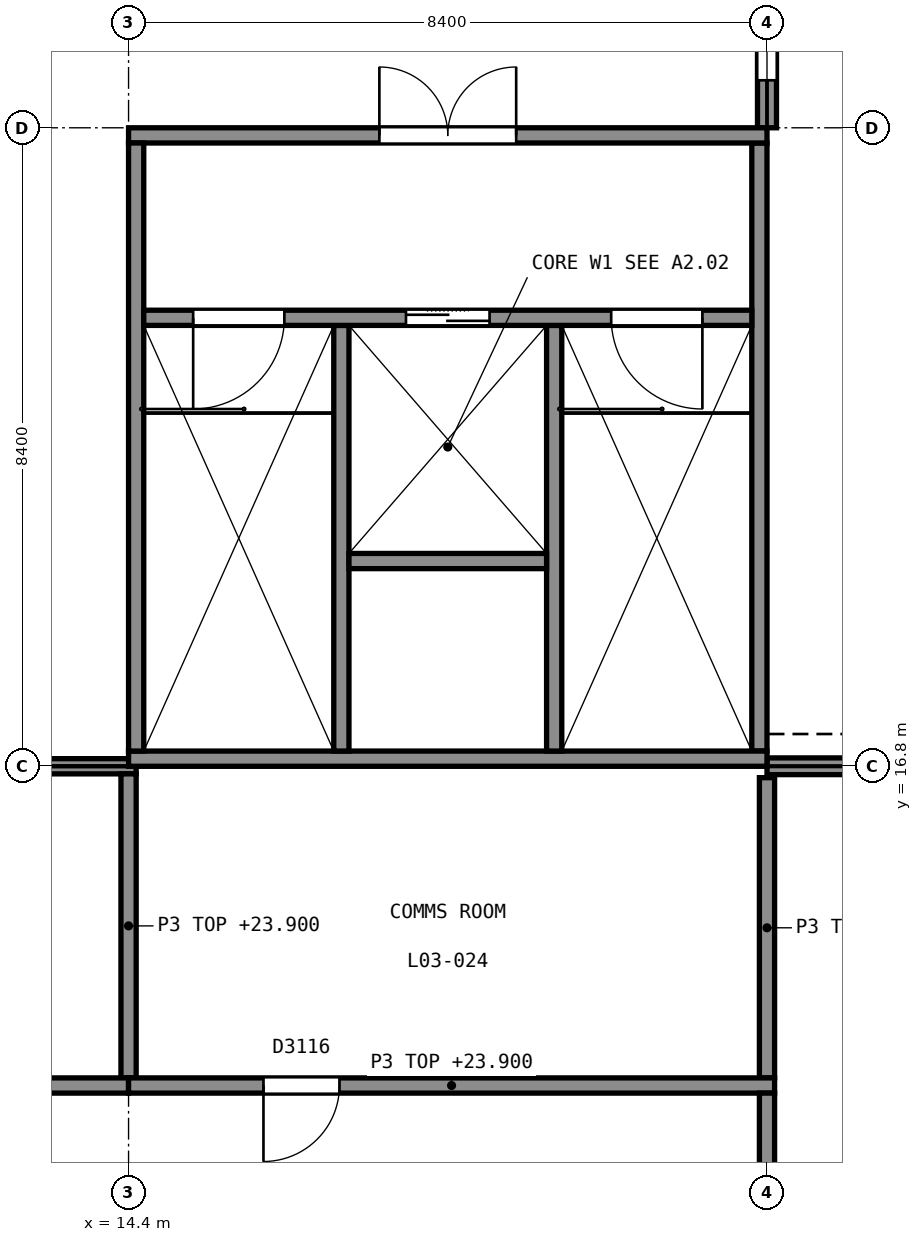
"""IFC4 building model, lengths in metres.
Left out: names, types, materials, properties, quantities, classifications, styles, units other than length and angle.
Written with IfcOpenShell. Run it as: python <this file> out.ifc"""

import sys

from ifc_helpers import new_model, si_unit, direction, frame, frame_2d, origin, place, context, subcontext, project, spatial, polyline, rectangle, outline, extrude, element, fill, save


model = new_model("IFC4")
c1 = context("Model", 3, precision=1e-05, world=origin(), true_north=direction((0.0, 1.0)))
c2 = subcontext(c1, "Body", "Model", "MODEL_VIEW")
j1 = project(units=[si_unit("LENGTHUNIT", "METRE"), si_unit("PLANEANGLEUNIT", "RADIAN")], contexts=[c1])
p1 = place(None, origin())
s1 = spatial("IfcSite", under=j1, at=p1, CompositionType="ELEMENT")
p2 = place(p1, origin())
s2 = spatial("IfcBuilding", under=s1, at=p2, CompositionType="ELEMENT")
p3 = place(p2, frame((0.0, 0.0, 20.0)))
s3 = spatial("IfcBuildingStorey", under=s2, at=p3, CompositionType="ELEMENT", Elevation=20.0)
p4 = place(p3, frame((14.4, 16.9, 0.0), z_axis=(0.0, 0.0, 1.0), x_axis=(1.0, 0.0, 0.0)))
e1 = element("IfcWall", 1, at=p4, inside=s3, PredefinedType="SHEAR", context=c2, shape_type="SweptSolid", body=[
    extrude(rectangle(XDim=8.4, YDim=0.2, at=frame_2d((4.2, 0.0))), origin(), (0.0, 0.0, 1.0), 8.8),
])
p5 = place(p3, frame((14.4, 25.1, 0.0), z_axis=(0.0, 0.0, 1.0), x_axis=(1.0, 0.0, 0.0)))
e2 = element("IfcWall", 2, at=p5, inside=s3, PredefinedType="SHEAR", context=c2, shape_type="SweptSolid", body=[
    extrude(outline(polyline([(0.0, 0.0), (8.4, 0.0), (8.4, 8.8), (7.531, 8.572), (7.241, 8.497), (5.503, 8.041), (5.214, 7.966), (3.186, 7.434), (2.896, 7.359), (1.159, 6.903), (0.869, 6.828), (0.0, 6.6), (0.0, 0.0)])), frame((0.0, 0.1, 0.0), z_axis=(0.0, -1.0, 0.0), x_axis=(1.0, 0.0, 0.0)), (0.0, 0.0, 1.0), 0.2),
])
p6 = place(p5, frame((3.3, 0.0, 0.0)))
e3 = element("IfcOpeningElement", 3, at=p6, cuts=e2, PredefinedType="OPENING", context=c2, shape_type="SweptSolid", body=[
    extrude(rectangle(XDim=1.8, YDim=2.1, at=frame_2d((0.9, 1.05))), frame((0.0, 0.11, 0.0), z_axis=(0.0, -1.0, 0.0), x_axis=(1.0, 0.0, 0.0)), (0.0, 0.0, 1.0), 0.22),
])
p7 = place(p3, frame((14.5, 17.0, 0.0), z_axis=(0.0, 0.0, 1.0), x_axis=(0.0, 1.0, 0.0)))
e4 = element("IfcWall", 4, at=p7, inside=s3, PredefinedType="SHEAR", context=c2, shape_type="SweptSolid", body=[
    extrude(rectangle(XDim=8.0, YDim=0.2, at=frame_2d((4.0, 0.0))), origin(), (0.0, 0.0, 1.0), 6.625),
])
p8 = place(p3, frame((22.7, 17.0, 0.0), z_axis=(0.0, 0.0, 1.0), x_axis=(0.0, 1.0, 0.0)))
e5 = element("IfcWall", 5, at=p8, inside=s3, PredefinedType="SHEAR", context=c2, shape_type="SweptSolid", body=[
    extrude(rectangle(XDim=8.0, YDim=0.2, at=frame_2d((4.0, 0.0))), origin(), (0.0, 0.0, 1.0), 8.775),
])
p9 = place(p3, frame((14.6, 22.7, 0.0), z_axis=(0.0, 0.0, 1.0), x_axis=(1.0, 0.0, 0.0)))
e6 = element("IfcWall", 6, at=p9, inside=s3, PredefinedType="SHEAR", context=c2, shape_type="SweptSolid", body=[
    extrude(outline(polyline([(0.0, 0.0), (8.0, 0.0), (8.0, 8.748), (7.407, 8.592), (7.111, 8.515), (6.815, 8.437), (6.519, 8.36), (5.926, 8.204), (5.63, 8.127), (5.333, 8.049), (5.037, 7.972), (4.444, 7.816), (4.148, 7.739), (3.852, 7.661), (3.556, 7.584), (2.963, 7.428), (2.667, 7.351), (2.37, 7.273), (2.074, 7.196), (1.481, 7.04), (1.185, 6.963), (0.889, 6.885), (0.593, 6.808), (0.0, 6.652), (0.0, 0.0)])), frame((0.0, 0.1, 0.0), z_axis=(0.0, -1.0, 0.0), x_axis=(1.0, 0.0, 0.0)), (0.0, 0.0, 1.0), 0.2),
])
p10 = place(p9, frame((0.65, 0.0, 0.0)))
e7 = element("IfcOpeningElement", 7, at=p10, cuts=e6, PredefinedType="OPENING", context=c2, shape_type="SweptSolid", body=[
    extrude(rectangle(XDim=1.2, YDim=2.1, at=frame_2d((0.6, 1.05))), frame((0.0, 0.11, 0.0), z_axis=(0.0, -1.0, 0.0), x_axis=(1.0, 0.0, 0.0)), (0.0, 0.0, 1.0), 0.22),
])
p11 = place(p9, frame((6.15, 0.0, 0.0)))
e8 = element("IfcOpeningElement", 8, at=p11, cuts=e6, PredefinedType="OPENING", context=c2, shape_type="SweptSolid", body=[
    extrude(rectangle(XDim=1.2, YDim=2.1, at=frame_2d((0.6, 1.05))), frame((0.0, 0.11, 0.0), z_axis=(0.0, -1.0, 0.0), x_axis=(1.0, 0.0, 0.0)), (0.0, 0.0, 1.0), 0.22),
])
p12 = place(p9, frame((3.45, 0.0, 0.0)))
e9 = element("IfcOpeningElement", 9, at=p12, cuts=e6, PredefinedType="OPENING", context=c2, shape_type="SweptSolid", body=[
    extrude(rectangle(XDim=1.1, YDim=2.1, at=frame_2d((0.55, 1.05))), frame((0.0, 0.11, 0.0), z_axis=(0.0, -1.0, 0.0), x_axis=(1.0, 0.0, 0.0)), (0.0, 0.0, 1.0), 0.22),
])
p13 = place(p3, frame((17.2, 17.0, 0.0), z_axis=(0.0, 0.0, 1.0), x_axis=(0.0, 1.0, 0.0)))
e10 = element("IfcWall", 10, at=p13, inside=s3, PredefinedType="SHEAR", context=c2, shape_type="SweptSolid", body=[
    extrude(rectangle(XDim=5.6, YDim=0.2, at=frame_2d((2.8, 0.0))), origin(), (0.0, 0.0, 1.0), 7.333),
])
p14 = place(p3, frame((20.0, 17.0, 0.0), z_axis=(0.0, 0.0, 1.0), x_axis=(0.0, 1.0, 0.0)))
e11 = element("IfcWall", 11, at=p14, inside=s3, PredefinedType="SHEAR", context=c2, shape_type="SweptSolid", body=[
    extrude(rectangle(XDim=5.6, YDim=0.2, at=frame_2d((2.8, 0.0))), origin(), (0.0, 0.0, 1.0), 8.067),
])
p15 = place(p3, frame((17.3, 19.5, 0.0), z_axis=(0.0, 0.0, 1.0), x_axis=(1.0, 0.0, 0.0)))
e12 = element("IfcWall", 12, at=p15, inside=s3, PredefinedType="SHEAR", context=c2, shape_type="SweptSolid", body=[
    extrude(outline(polyline([(0.0, 0.0), (2.6, 0.0), (2.6, 8.04), (2.311, 7.965), (1.733, 7.813), (1.444, 7.738), (1.156, 7.662), (0.867, 7.587), (0.289, 7.435), (0.0, 7.36), (0.0, 0.0)])), frame((0.0, 0.1, 0.0), z_axis=(0.0, -1.0, 0.0), x_axis=(1.0, 0.0, 0.0)), (0.0, 0.0, 1.0), 0.2),
])
p16 = place(p3, frame((22.8, 16.8, 0.0), z_axis=(0.0, 0.0, 1.0), x_axis=(1.0, 0.0, 0.0)))
e13 = element("IfcWall", 13, at=p16, inside=s3, PredefinedType="SOLIDWALL", context=c2, shape_type="SweptSolid", body=[
    extrude(rectangle(XDim=8.05, YDim=0.22, at=frame_2d((4.025, 0.0))), origin(), (0.0, 0.0, 1.0), 3.94),
])
p17 = place(p16, frame((2.225, 0.0, 0.9)))
e14 = element("IfcOpeningElement", 14, at=p17, cuts=e13, PredefinedType="OPENING", context=c2, shape_type="SweptSolid", body=[
    extrude(rectangle(XDim=3.6, YDim=1.5, at=frame_2d((1.8, 0.75))), frame((0.0, 0.12, 0.0), z_axis=(0.0, -1.0, 0.0), x_axis=(1.0, 0.0, 0.0)), (0.0, 0.0, 1.0), 0.24),
])
p18 = place(p3, frame((22.8, 25.2, 0.0), z_axis=(0.0, 0.0, 1.0), x_axis=(0.0, 1.0, 0.0)))
e15 = element("IfcWall", 15, at=p18, inside=s3, PredefinedType="SOLIDWALL", context=c2, shape_type="SweptSolid", body=[
    extrude(rectangle(XDim=8.05, YDim=0.25, at=frame_2d((4.025, 0.0))), origin(), (0.0, 0.0, 1.0), 8.746),
])
p19 = place(p18, frame((0.625, 0.0, 0.9)))
e16 = element("IfcOpeningElement", 16, at=p19, cuts=e15, PredefinedType="OPENING", context=c2, shape_type="SweptSolid", body=[
    extrude(rectangle(XDim=1.2, YDim=2.1, at=frame_2d((0.6, 1.05))), frame((0.0, 0.135, 0.0), z_axis=(0.0, -1.0, 0.0), x_axis=(1.0, 0.0, 0.0)), (0.0, 0.0, 1.0), 0.27),
])
p20 = place(p18, frame((2.85, 0.0, 0.9)))
e17 = element("IfcOpeningElement", 17, at=p20, cuts=e15, PredefinedType="OPENING", context=c2, shape_type="SweptSolid", body=[
    extrude(rectangle(XDim=1.2, YDim=2.1, at=frame_2d((0.6, 1.05))), frame((0.0, 0.135, 0.0), z_axis=(0.0, -1.0, 0.0), x_axis=(1.0, 0.0, 0.0)), (0.0, 0.0, 1.0), 0.27),
])
p21 = place(p18, frame((6.225, 0.0, 0.9)))
e18 = element("IfcOpeningElement", 18, at=p21, cuts=e15, PredefinedType="OPENING", context=c2, shape_type="SweptSolid", body=[
    extrude(rectangle(XDim=1.2, YDim=2.1, at=frame_2d((0.6, 1.05))), frame((0.0, 0.135, 0.0), z_axis=(0.0, -1.0, 0.0), x_axis=(1.0, 0.0, 0.0)), (0.0, 0.0, 1.0), 0.27),
])
p22 = place(p3, frame((6.35, 16.8, 0.0), z_axis=(0.0, 0.0, 1.0), x_axis=(1.0, 0.0, 0.0)))
e19 = element("IfcWall", 19, at=p22, inside=s3, PredefinedType="PARTITIONING", context=c2, shape_type="SweptSolid", body=[
    extrude(rectangle(XDim=8.15, YDim=0.2, at=frame_2d((4.075, 0.0))), origin(), (0.0, 0.0, 1.0), 3.562),
])
p23 = place(p22, frame((5.438, 0.0, 0.0)))
e20 = element("IfcOpeningElement", 20, at=p23, cuts=e19, PredefinedType="OPENING", context=c2, shape_type="SweptSolid", body=[
    extrude(rectangle(XDim=1.0, YDim=2.1, at=frame_2d((0.5, 1.05))), frame((0.0, 0.11, 0.0), z_axis=(0.0, -1.0, 0.0), x_axis=(1.0, 0.0, 0.0)), (0.0, 0.0, 1.0), 0.22),
])
p24 = place(p3, frame((14.4, 12.7, 0.0), z_axis=(0.0, 0.0, 1.0), x_axis=(0.0, 1.0, 0.0)))
e21 = element("IfcWall", 21, at=p24, inside=s3, PredefinedType="PARTITIONING", context=c2, shape_type="SweptSolid", body=[
    extrude(rectangle(XDim=4.0, YDim=0.2, at=frame_2d((2.0, 0.0))), origin(), (0.0, 0.0, 1.0), 3.9),
])
p25 = place(p3, frame((22.8, 12.7, 0.0), z_axis=(0.0, 0.0, 1.0), x_axis=(0.0, 1.0, 0.0)))
e22 = element("IfcWall", 22, at=p25, inside=s3, PredefinedType="PARTITIONING", context=c2, shape_type="SweptSolid", body=[
    extrude(rectangle(XDim=3.95, YDim=0.2, at=frame_2d((1.975, 0.0))), origin(), (0.0, 0.0, 1.0), 3.9),
])
p26 = place(p3, frame((6.15, 12.6, 0.0), z_axis=(0.0, 0.0, 1.0), x_axis=(1.0, 0.0, 0.0)))
e23 = element("IfcWall", 23, at=p26, inside=s3, PredefinedType="PARTITIONING", context=c2, shape_type="SweptSolid", body=[
    extrude(rectangle(XDim=8.25, YDim=0.2, at=frame_2d((4.125, 0.0))), origin(), (0.0, 0.0, 1.0), 3.9),
])
p27 = place(p3, frame((14.4, 12.6, 0.0), z_axis=(0.0, 0.0, 1.0), x_axis=(1.0, 0.0, 0.0)))
e24 = element("IfcWall", 24, at=p27, inside=s3, PredefinedType="PARTITIONING", context=c2, shape_type="SweptSolid", body=[
    extrude(rectangle(XDim=8.5, YDim=0.2, at=frame_2d((4.25, 0.0))), origin(), (0.0, 0.0, 1.0), 3.9),
])
p28 = place(p27, frame((1.775, 0.0, 0.0)))
e25 = element("IfcOpeningElement", 25, at=p28, cuts=e24, PredefinedType="OPENING", context=c2, shape_type="SweptSolid", body=[
    extrude(rectangle(XDim=1.0, YDim=2.1, at=frame_2d((0.5, 1.05))), frame((0.0, 0.11, 0.0), z_axis=(0.0, -1.0, 0.0), x_axis=(1.0, 0.0, 0.0)), (0.0, 0.0, 1.0), 0.22),
])
p29 = place(p3, frame((22.8, 8.75, 0.0), z_axis=(0.0, 0.0, 1.0), x_axis=(0.0, 1.0, 0.0)))
e26 = element("IfcWall", 26, at=p29, inside=s3, PredefinedType="PARTITIONING", context=c2, shape_type="SweptSolid", body=[
    extrude(rectangle(XDim=3.75, YDim=0.2, at=frame_2d((1.875, 0.0))), origin(), (0.0, 0.0, 1.0), 3.9),
])
p30 = place(p19, origin())
e27 = element("IfcWindow", 27, at=p30, inside=s3, PartitioningType="SINGLE_PANEL", PredefinedType="WINDOW", context=c2, shape_type="SweptSolid", body=[
    extrude(rectangle(XDim=1.2, YDim=2.1, at=frame_2d((0.6, 1.05))), frame((0.0, 0.105, 0.0), z_axis=(0.0, -1.0, 0.0), x_axis=(1.0, 0.0, 0.0)), (0.0, 0.0, 1.0), 0.06),
])
fill(e16, e27)
p31 = place(p28, origin())
e28 = element("IfcDoor", 28, at=p31, inside=s3, OperationType="SINGLE_SWING_LEFT", PredefinedType="DOOR", context=c2, shape_type="SweptSolid", body=[
    extrude(rectangle(XDim=1.0, YDim=2.1, at=frame_2d((0.5, 1.05))), frame((0.0, 0.025, 0.0), z_axis=(0.0, -1.0, 0.0), x_axis=(1.0, 0.0, 0.0)), (0.0, 0.0, 1.0), 0.05),
])
fill(e25, e28)
p32 = place(p6, origin())
e29 = element("IfcDoor", 29, at=p32, inside=s3, OperationType="DOUBLE_DOOR_SINGLE_SWING", PredefinedType="DOOR", context=c2, shape_type="SweptSolid", body=[
    extrude(rectangle(XDim=1.8, YDim=2.1, at=frame_2d((0.9, 1.05))), frame((0.0, 0.025, 0.0), z_axis=(0.0, -1.0, 0.0), x_axis=(1.0, 0.0, 0.0)), (0.0, 0.0, 1.0), 0.05),
])
fill(e3, e29)
p33 = place(p10, origin())
e30 = element("IfcDoor", 30, at=p33, inside=s3, OperationType="SINGLE_SWING_LEFT", PredefinedType="DOOR", context=c2, shape_type="SweptSolid", body=[
    extrude(rectangle(XDim=1.2, YDim=2.1, at=frame_2d((0.6, 1.05))), frame((0.0, 0.025, 0.0), z_axis=(0.0, -1.0, 0.0), x_axis=(1.0, 0.0, 0.0)), (0.0, 0.0, 1.0), 0.05),
])
fill(e7, e30)
p34 = place(p11, origin())
e31 = element("IfcDoor", 31, at=p34, inside=s3, OperationType="SINGLE_SWING_RIGHT", PredefinedType="DOOR", context=c2, shape_type="SweptSolid", body=[
    extrude(rectangle(XDim=1.2, YDim=2.1, at=frame_2d((0.6, 1.05))), frame((0.0, 0.025, 0.0), z_axis=(0.0, -1.0, 0.0), x_axis=(1.0, 0.0, 0.0)), (0.0, 0.0, 1.0), 0.05),
])
fill(e8, e31)
p35 = place(p12, origin())
e32 = element("IfcDoor", 32, at=p35, inside=s3, OperationType="DOUBLE_DOOR_SLIDING", PredefinedType="DOOR", context=c2, shape_type="SweptSolid", body=[
    extrude(rectangle(XDim=1.1, YDim=2.1, at=frame_2d((0.55, 1.05))), frame((0.0, 0.025, 0.0), z_axis=(0.0, -1.0, 0.0), x_axis=(1.0, 0.0, 0.0)), (0.0, 0.0, 1.0), 0.05),
])
fill(e9, e32)
save(model, sys.argv[1])
